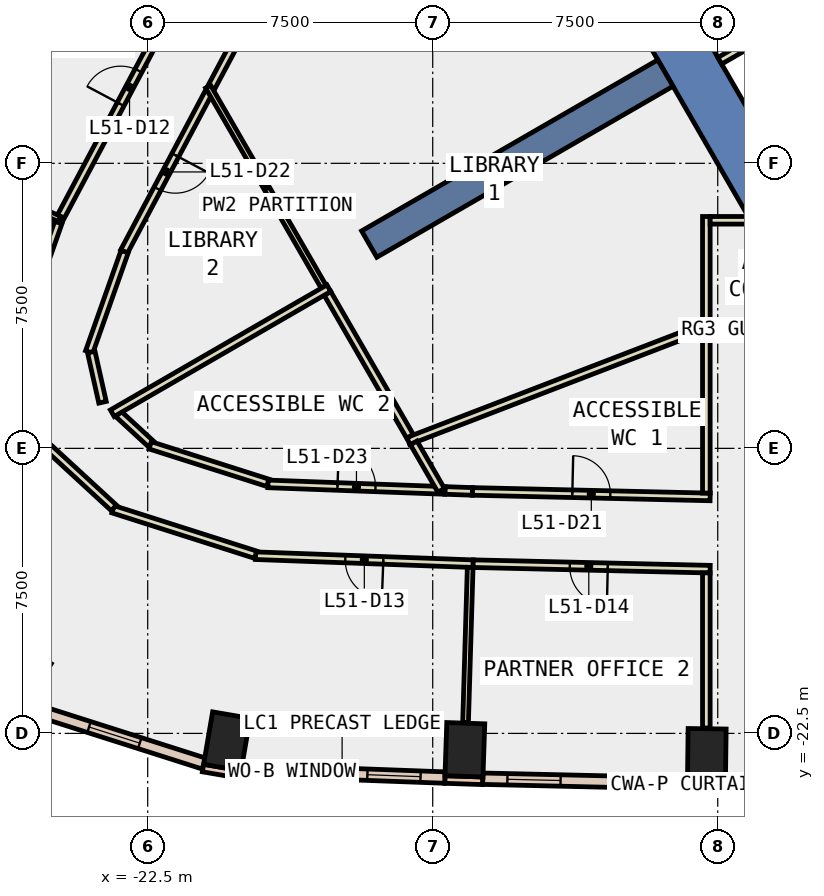
"""IFC4 building model, lengths in metres.
Left out: names, types, materials, properties, quantities, classifications, styles, units other than length and angle.
Written with IfcOpenShell. Run it as: python <this file> out.ifc"""

import sys

from ifc_helpers import new_model, si_unit, direction, frame, frame_2d, origin, origin_2d, place, context, subcontext, project, spatial, polyline, rectangle, outline, extrude, element, fill, save


model = new_model("IFC4")
c1 = context("Model", 3, precision=1e-05, world=origin(), true_north=direction((0.0, 1.0)))
c2 = subcontext(c1, "Body", "Model", "MODEL_VIEW")
j1 = project(units=[si_unit("LENGTHUNIT", "METRE"), si_unit("PLANEANGLEUNIT", "RADIAN")], contexts=[c1])
p1 = place(None, origin())
s1 = spatial("IfcSite", under=j1, at=p1, CompositionType="ELEMENT")
p2 = place(p1, origin())
s2 = spatial("IfcBuilding", under=s1, at=p2, CompositionType="ELEMENT")
p3 = place(p2, frame((0.0, 0.0, 227.6)))
s3 = spatial("IfcBuildingStorey", under=s2, at=p3, CompositionType="ELEMENT", Elevation=227.6)
for number, where, z_axis, x_axis in (
    (1, (-20.417, -22.708, -0.4), (0.0, 0.0, 1.0), (-0.986, 0.169, 0.0)),
    (2, (-14.154, -22.931, -0.4), (0.0, 0.0, 1.0), (-0.999, 0.034, 0.0)),
    (3, (-7.788, -23.078, -0.4), (0.0, 0.0, 1.0), (-1.0, 0.013, 0.0)),
):
    element("IfcColumn", number, at=place(p3, frame(where, z_axis=z_axis, x_axis=x_axis)), inside=s3, PredefinedType="COLUMN", context=c2, shape_type="SweptSolid", body=[
        extrude(rectangle(XDim=1.0, YDim=1.4, at=origin_2d()), origin(), (0.0, 0.0, 1.0), 4.2),
    ])
p4 = place(p3, frame((0.0, 0.0, -0.4)))
e4 = element("IfcWall", 4, at=p4, inside=s3, PredefinedType="SHEAR", context=c2, shape_type="SweptSolid", body=[
    extrude(outline(polyline([(-13.279, 2.5), (-6.64, -9.0), (-5.831, -7.6), (-11.662, 2.5), (-13.279, 2.5)])), origin(), (0.0, 0.0, 1.0), 4.2),
])
p5 = place(p3, frame((-8.877, -5.125, -0.4), z_axis=(0.0, 0.0, 1.0), x_axis=(-0.866017533419, -0.500013631625, 0.0)))
e5 = element("IfcWall", 5, at=p5, inside=s3, PredefinedType="SHEAR", context=c2, shape_type="SweptSolid", body=[
    extrude(rectangle(XDim=9.0, YDim=0.8, at=frame_2d((4.5, 0.0))), origin(), (0.0, 0.0, 1.0), 4.2),
])
p6 = place(p3, frame((-21.045, -23.412, 0.0), z_axis=(0.0, 0.0, 1.0), x_axis=(0.985631544579, -0.168909615862, 0.0)))
e6 = element("IfcWall", 6, at=p6, inside=s3, PredefinedType="STANDARD", context=c2, shape_type="SweptSolid", body=[
    extrude(rectangle(XDim=1.0, YDim=0.2, at=frame_2d((0.5, 0.0))), origin(), (0.0, 0.0, 1.0), 3.8),
])
p7 = place(p3, frame((-14.681, -23.713, 0.0), z_axis=(0.0, 0.0, 1.0), x_axis=(0.999415245245, -0.034193092457, 0.0)))
e7 = element("IfcWall", 7, at=p7, inside=s3, PredefinedType="STANDARD", context=c2, shape_type="SweptSolid", body=[
    extrude(rectangle(XDim=1.0, YDim=0.2, at=frame_2d((0.5, 0.0))), origin(), (0.0, 0.0, 1.0), 3.8),
])
p8 = place(p3, frame((-8.299, -23.871, 0.0), z_axis=(0.0, 0.0, 1.0), x_axis=(0.999903186316, -0.013914668364, 0.0)))
e8 = element("IfcWall", 8, at=p8, inside=s3, PredefinedType="STANDARD", context=c2, shape_type="SweptSolid", body=[
    extrude(rectangle(XDim=1.0, YDim=0.2, at=frame_2d((0.5, 0.0))), origin(), (0.0, 0.0, 1.0), 3.8),
])
p9 = place(p3, frame((-20.04, -23.464, 0.0), z_axis=(0.0, 0.0, 1.0), x_axis=(0.999318693414, -0.036907302717, 0.0)))
e9 = element("IfcWall", 9, at=p9, inside=s3, PredefinedType="STANDARD", context=c2, shape_type="SweptSolid", body=[
    extrude(rectangle(XDim=5.365, YDim=0.3, at=frame_2d((2.682, 0.0))), origin(), (0.0, 0.0, 1.0), 3.8),
])
p10 = place(p9, frame((0.641, 0.0, 0.9)))
e10 = element("IfcOpeningElement", 10, at=p10, cuts=e9, PredefinedType="OPENING", context=c2, shape_type="SweptSolid", body=[
    extrude(rectangle(XDim=1.4, YDim=2.6, at=frame_2d((0.7, 1.3))), frame((0.0, 0.16, 0.0), z_axis=(0.0, -1.0, 0.0), x_axis=(1.0, 0.0, 0.0)), (0.0, 0.0, 1.0), 0.32),
])
p11 = place(p9, frame((3.323, 0.0, 0.9)))
e11 = element("IfcOpeningElement", 11, at=p11, cuts=e9, PredefinedType="OPENING", context=c2, shape_type="SweptSolid", body=[
    extrude(rectangle(XDim=1.4, YDim=2.6, at=frame_2d((0.7, 1.3))), frame((0.0, 0.16, 0.0), z_axis=(0.0, -1.0, 0.0), x_axis=(1.0, 0.0, 0.0)), (0.0, 0.0, 1.0), 0.32),
])
p12 = place(p3, frame((-13.681, -23.692, 0.0), z_axis=(0.0, 0.0, 1.0), x_axis=(0.999734766333, -0.023030349233, 0.0)))
e12 = element("IfcWall", 12, at=p12, inside=s3, PredefinedType="STANDARD", context=c2, shape_type="SweptSolid", body=[
    extrude(rectangle(XDim=5.385, YDim=0.3, at=frame_2d((2.693, 0.0))), origin(), (0.0, 0.0, 1.0), 3.8),
])
p13 = place(p12, frame((0.646, 0.0, 0.9)))
e13 = element("IfcOpeningElement", 13, at=p13, cuts=e12, PredefinedType="OPENING", context=c2, shape_type="SweptSolid", body=[
    extrude(rectangle(XDim=1.4, YDim=2.6, at=frame_2d((0.7, 1.3))), frame((0.0, 0.16, 0.0), z_axis=(0.0, -1.0, 0.0), x_axis=(1.0, 0.0, 0.0)), (0.0, 0.0, 1.0), 0.32),
])
p14 = place(p12, frame((3.339, 0.0, 0.9)))
e14 = element("IfcOpeningElement", 14, at=p14, cuts=e12, PredefinedType="OPENING", context=c2, shape_type="SweptSolid", body=[
    extrude(rectangle(XDim=1.4, YDim=2.6, at=frame_2d((0.7, 1.3))), frame((0.0, 0.16, 0.0), z_axis=(0.0, -1.0, 0.0), x_axis=(1.0, 0.0, 0.0)), (0.0, 0.0, 1.0), 0.32),
])
p15 = place(p3, frame((-25.729, -21.795, 0.0), z_axis=(0.0, 0.0, 1.0), x_axis=(0.952886818649, -0.30332608006, 0.0)))
e15 = element("IfcWall", 15, at=p15, inside=s3, PredefinedType="STANDARD", context=c2, shape_type="SweptSolid", body=[
    extrude(rectangle(XDim=4.939, YDim=0.3, at=frame_2d((2.469, 0.0))), origin(), (0.0, 0.0, 1.0), 3.8),
])
p16 = place(p15, frame((1.769, 0.0, 0.9)))
e16 = element("IfcOpeningElement", 16, at=p16, cuts=e15, PredefinedType="OPENING", context=c2, shape_type="SweptSolid", body=[
    extrude(rectangle(XDim=1.4, YDim=2.6, at=frame_2d((0.7, 1.3))), frame((0.0, 0.16, 0.0), z_axis=(0.0, -1.0, 0.0), x_axis=(1.0, 0.0, 0.0)), (0.0, 0.0, 1.0), 0.32),
])
p17 = place(p3, frame((-19.419, -2.856, 0.0), z_axis=(0.0, 0.0, 1.0), x_axis=(-0.469627838973, -0.882864481595, 0.0)))
e17 = element("IfcWall", 17, at=p17, inside=s3, PredefinedType="PARTITIONING", context=c2, shape_type="SweptSolid", body=[
    extrude(rectangle(XDim=2.996, YDim=0.2, at=frame_2d((1.498, 0.0))), origin(), (0.0, 0.0, 1.0), 3.8),
])
p18 = place(p3, frame((-14.679, -16.107, 0.0), z_axis=(0.0, 0.0, 1.0), x_axis=(0.999351224613, -0.036015689132, 0.0)))
e18 = element("IfcWall", 18, at=p18, inside=s3, PredefinedType="PARTITIONING", context=c2, shape_type="SweptSolid", body=[
    extrude(rectangle(XDim=0.725, YDim=0.2, at=frame_2d((0.363, 0.0))), origin(), (0.0, 0.0, 1.0), 3.8),
])
p19 = place(p3, frame((-13.954, -16.133, 0.0), z_axis=(0.0, 0.0, 1.0), x_axis=(0.999731273021, -0.023181495732, 0.0)))
e19 = element("IfcWall", 19, at=p19, inside=s3, PredefinedType="PARTITIONING", context=c2, shape_type="SweptSolid", body=[
    extrude(rectangle(XDim=6.256, YDim=0.2, at=frame_2d((3.128, 0.0))), origin(), (0.0, 0.0, 1.0), 3.8),
])
p20 = place(p19, frame((2.628, 0.0, 0.0)))
e20 = element("IfcOpeningElement", 20, at=p20, cuts=e19, PredefinedType="OPENING", context=c2, shape_type="SweptSolid", body=[
    extrude(rectangle(XDim=1.0, YDim=2.1, at=frame_2d((0.5, 1.05))), frame((0.0, 0.11, 0.0), z_axis=(0.0, -1.0, 0.0), x_axis=(1.0, 0.0, 0.0)), (0.0, 0.0, 1.0), 0.22),
])
p21 = place(p3, frame((-20.896, -5.634, 0.0), z_axis=(0.0, 0.0, 1.0), x_axis=(-0.469448951755, -0.882959614986, 0.0)))
e21 = element("IfcWall", 21, at=p21, inside=s3, PredefinedType="PARTITIONING", context=c2, shape_type="SweptSolid", body=[
    extrude(rectangle(XDim=4.74, YDim=0.2, at=frame_2d((2.37, 0.0))), origin(), (0.0, 0.0, 1.0), 3.8),
])
p22 = place(p21, frame((1.87, 0.0, 0.0)))
e22 = element("IfcOpeningElement", 22, at=p22, cuts=e21, PredefinedType="OPENING", context=c2, shape_type="SweptSolid", body=[
    extrude(rectangle(XDim=1.0, YDim=2.1, at=frame_2d((0.5, 1.05))), frame((0.0, 0.11, 0.0), z_axis=(0.0, -1.0, 0.0), x_axis=(1.0, 0.0, 0.0)), (0.0, 0.0, 1.0), 0.22),
])
p23 = place(p3, frame((-23.108, -9.825, 0.0), z_axis=(0.0, 0.0, 1.0), x_axis=(-0.333166995935, -0.942867834227, 0.0)))
e23 = element("IfcWall", 23, at=p23, inside=s3, PredefinedType="PARTITIONING", context=c2, shape_type="SweptSolid", body=[
    extrude(rectangle(XDim=2.798, YDim=0.2, at=frame_2d((1.399, 0.0))), origin(), (0.0, 0.0, 1.0), 3.8),
])
p24 = place(p3, frame((-23.985, -12.467, 0.0), z_axis=(0.0, 0.0, 1.0), x_axis=(0.2188980935, -0.975747725932, 0.0)))
e24 = element("IfcWall", 24, at=p24, inside=s3, PredefinedType="PARTITIONING", context=c2, shape_type="SweptSolid", body=[
    extrude(rectangle(XDim=1.353, YDim=0.2, at=frame_2d((0.676, 0.0))), origin(), (0.0, 0.0, 1.0), 3.8),
])
p25 = place(p3, frame((-23.272, -14.093, 0.0), z_axis=(0.0, 0.0, 1.0), x_axis=(0.735605495063, -0.677410182705, 0.0)))
e25 = element("IfcWall", 25, at=p25, inside=s3, PredefinedType="PARTITIONING", context=c2, shape_type="SweptSolid", body=[
    extrude(rectangle(XDim=1.166, YDim=0.2, at=frame_2d((0.583, 0.0))), origin(), (0.0, 0.0, 1.0), 3.8),
])
p26 = place(p3, frame((-22.435, -14.92, 0.0), z_axis=(0.0, 0.0, 1.0), x_axis=(0.952831275662, -0.303500510906, 0.0)))
e26 = element("IfcWall", 26, at=p26, inside=s3, PredefinedType="PARTITIONING", context=c2, shape_type="SweptSolid", body=[
    extrude(rectangle(XDim=3.259, YDim=0.2, at=frame_2d((1.629, 0.0))), origin(), (0.0, 0.0, 1.0), 3.8),
])
p27 = place(p3, frame((-19.335, -15.935, 0.0), z_axis=(0.0, 0.0, 1.0), x_axis=(0.999319348495, -0.036889561184, 0.0)))
e27 = element("IfcWall", 27, at=p27, inside=s3, PredefinedType="PARTITIONING", context=c2, shape_type="SweptSolid", body=[
    extrude(rectangle(XDim=4.659, YDim=0.2, at=frame_2d((2.33, 0.0))), origin(), (0.0, 0.0, 1.0), 3.8),
])
p28 = place(p27, frame((1.83, 0.0, 0.0)))
e28 = element("IfcOpeningElement", 28, at=p28, cuts=e27, PredefinedType="OPENING", context=c2, shape_type="SweptSolid", body=[
    extrude(rectangle(XDim=1.0, YDim=2.1, at=frame_2d((0.5, 1.05))), frame((0.0, 0.11, 0.0), z_axis=(0.0, -1.0, 0.0), x_axis=(1.0, 0.0, 0.0)), (0.0, 0.0, 1.0), 0.22),
])
p29 = place(p3, frame((-24.866, -9.053, 0.0), z_axis=(0.0, 0.0, 1.0), x_axis=(0.469431794586, 0.882968736837, 0.0)))
e29 = element("IfcWall", 29, at=p29, inside=s3, PredefinedType="PARTITIONING", context=c2, shape_type="SweptSolid", body=[
    extrude(rectangle(XDim=8.046, YDim=0.2, at=frame_2d((4.023, 0.0))), origin(), (0.0, 0.0, 1.0), 3.8),
])
p30 = place(p29, frame((3.522, 0.0, 0.0)))
e30 = element("IfcOpeningElement", 30, at=p30, cuts=e29, PredefinedType="OPENING", context=c2, shape_type="SweptSolid", body=[
    extrude(rectangle(XDim=1.0, YDim=2.1, at=frame_2d((0.5, 1.05))), frame((0.0, 0.11, 0.0), z_axis=(0.0, -1.0, 0.0), x_axis=(1.0, 0.0, 0.0)), (0.0, 0.0, 1.0), 0.22),
])
p31 = place(p3, frame((-13.936, -18.035, 0.0), z_axis=(0.0, 0.0, 1.0), x_axis=(-0.999322629955, 0.036800560578, 0.0)))
e31 = element("IfcWall", 31, at=p31, inside=s3, PredefinedType="PARTITIONING", context=c2, shape_type="SweptSolid", body=[
    extrude(rectangle(XDim=5.732, YDim=0.2, at=frame_2d((2.866, 0.0))), origin(), (0.0, 0.0, 1.0), 3.8),
])
p32 = place(p31, frame((2.366, 0.0, 0.0)))
e32 = element("IfcOpeningElement", 32, at=p32, cuts=e31, PredefinedType="OPENING", context=c2, shape_type="SweptSolid", body=[
    extrude(rectangle(XDim=1.0, YDim=2.1, at=frame_2d((0.5, 1.05))), frame((0.0, 0.11, 0.0), z_axis=(0.0, -1.0, 0.0), x_axis=(1.0, 0.0, 0.0)), (0.0, 0.0, 1.0), 0.22),
])
p33 = place(p3, frame((-19.66, -17.798, 0.0), z_axis=(0.0, 0.0, 1.0), x_axis=(-0.952838618572, 0.303477457083, 0.0)))
e33 = element("IfcWall", 33, at=p33, inside=s3, PredefinedType="PARTITIONING", context=c2, shape_type="SweptSolid", body=[
    extrude(rectangle(XDim=3.938, YDim=0.2, at=frame_2d((1.969, 0.0))), origin(), (0.0, 0.0, 1.0), 3.8),
])
p34 = place(p3, frame((-23.391, -16.566, 0.0), z_axis=(0.0, 0.0, 1.0), x_axis=(-0.735846476242, 0.677148405745, 0.0)))
e34 = element("IfcWall", 34, at=p34, inside=s3, PredefinedType="PARTITIONING", context=c2, shape_type="SweptSolid", body=[
    extrude(rectangle(XDim=2.878, YDim=0.2, at=frame_2d((1.439, 0.0))), origin(), (0.0, 0.0, 1.0), 3.8),
])
p35 = place(p3, frame((-26.013, -12.345, 0.0), z_axis=(0.0, 0.0, 1.0), x_axis=(0.333116923704, 0.942885526001, 0.0)))
e35 = element("IfcWall", 35, at=p35, inside=s3, PredefinedType="PARTITIONING", context=c2, shape_type="SweptSolid", body=[
    extrude(rectangle(XDim=3.485, YDim=0.2, at=frame_2d((1.742, 0.0))), origin(), (0.0, 0.0, 1.0), 3.8),
])
p36 = place(p3, frame((-7.7, -18.179, 0.0), z_axis=(0.0, 0.0, 1.0), x_axis=(-0.999729714353, 0.023248618029, 0.0)))
e36 = element("IfcWall", 36, at=p36, inside=s3, PredefinedType="PARTITIONING", context=c2, shape_type="SweptSolid", body=[
    extrude(rectangle(XDim=6.238, YDim=0.2, at=frame_2d((3.119, 0.0))), origin(), (0.0, 0.0, 1.0), 3.8),
])
p37 = place(p36, frame((2.694, 0.0, 0.0)))
e37 = element("IfcOpeningElement", 37, at=p37, cuts=e36, PredefinedType="OPENING", context=c2, shape_type="SweptSolid", body=[
    extrude(rectangle(XDim=1.0, YDim=2.1, at=frame_2d((0.5, 1.05))), frame((0.0, 0.11, 0.0), z_axis=(0.0, -1.0, 0.0), x_axis=(1.0, 0.0, 0.0)), (0.0, 0.0, 1.0), 0.22),
])
p38 = place(p3, frame((-5.888, -3.902, 0.0), z_axis=(0.0, 0.0, 1.0), x_axis=(-0.866316547501, -0.499495384889, 0.0)))
e38 = element("IfcWall", 38, at=p38, inside=s3, PredefinedType="PARTITIONING", context=c2, shape_type="SweptSolid", body=[
    extrude(rectangle(XDim=1.8, YDim=0.2, at=frame_2d((0.9, 0.0))), origin(), (0.0, 0.0, 1.0), 3.8),
])
p39 = place(p3, frame((-7.8, -11.69, 0.0), z_axis=(0.0, 0.0, 1.0), x_axis=(0.0, 1.0, 0.0)))
e39 = element("IfcWall", 39, at=p39, inside=s3, PredefinedType="PARTITIONING", context=c2, shape_type="SweptSolid", body=[
    extrude(rectangle(XDim=2.791, YDim=0.2, at=frame_2d((1.396, 0.0))), origin(), (0.0, 0.0, 1.0), 3.8),
])
p40 = place(p3, frame((-7.7, -8.999, 0.0), z_axis=(0.0, 0.0, 1.0), x_axis=(1.0, 0.0, 0.0)))
e40 = element("IfcWall", 40, at=p40, inside=s3, PredefinedType="PARTITIONING", context=c2, shape_type="SweptSolid", body=[
    extrude(rectangle(XDim=1.059, YDim=0.2, at=frame_2d((0.529, 0.0))), origin(), (0.0, 0.0, 1.0), 3.8),
])
p41 = place(p3, frame((-7.8, -16.176, 0.0), z_axis=(0.0, 0.0, 1.0), x_axis=(0.0, 1.0, 0.0)))
e41 = element("IfcWall", 41, at=p41, inside=s3, PredefinedType="PARTITIONING", context=c2, shape_type="SweptSolid", body=[
    extrude(rectangle(XDim=4.286, YDim=0.2, at=frame_2d((2.143, 0.0))), origin(), (0.0, 0.0, 1.0), 3.8),
])
p42 = place(p3, frame((-7.8, -22.358, 0.0), z_axis=(0.0, 0.0, 1.0), x_axis=(0.0, 1.0, 0.0)))
e42 = element("IfcWall", 42, at=p42, inside=s3, PredefinedType="PARTITIONING", context=c2, shape_type="SweptSolid", body=[
    extrude(rectangle(XDim=4.082, YDim=0.2, at=frame_2d((2.041, 0.0))), origin(), (0.0, 0.0, 1.0), 3.8),
])
p43 = place(p3, frame((-7.707, -11.755, 0.0), z_axis=(0.0, 0.0, 1.0), x_axis=(-0.933420343818, -0.358784701105, 0.0)))
e43 = element("IfcWall", 43, at=p43, inside=s3, PredefinedType="PARTITIONING", context=c2, shape_type="SweptSolid", body=[
    extrude(rectangle(XDim=8.501, YDim=0.2, at=frame_2d((4.25, 0.0))), origin(), (0.0, 0.0, 1.0), 3.8),
])
p44 = place(p3, frame((-17.87, -10.749, 0.0), z_axis=(0.0, 0.0, 1.0), x_axis=(-0.499907758807, 0.866078652713, 0.0)))
e44 = element("IfcWall", 44, at=p44, inside=s3, PredefinedType="PARTITIONING", context=c2, shape_type="SweptSolid", body=[
    extrude(rectangle(XDim=6.083, YDim=0.15, at=frame_2d((3.042, 0.0))), origin(), (0.0, 0.0, 1.0), 3.8),
])
p45 = place(p3, frame((-15.599, -14.682, 0.0), z_axis=(0.0, 0.0, 1.0), x_axis=(-0.500033987016, 0.866005780482, 0.0)))
e45 = element("IfcWall", 45, at=p45, inside=s3, PredefinedType="PARTITIONING", context=c2, shape_type="SweptSolid", body=[
    extrude(rectangle(XDim=4.342, YDim=0.2, at=frame_2d((2.171, 0.0))), origin(), (0.0, 0.0, 1.0), 3.8),
])
p46 = place(p3, frame((-14.778, -16.103, 0.0), z_axis=(0.0, 0.0, 1.0), x_axis=(-0.500495009846, 0.865739421027, 0.0)))
e46 = element("IfcWall", 46, at=p46, inside=s3, PredefinedType="PARTITIONING", context=c2, shape_type="SweptSolid", body=[
    extrude(rectangle(XDim=1.44, YDim=0.2, at=frame_2d((0.72, 0.0))), origin(), (0.0, 0.0, 1.0), 3.8),
])
p47 = place(p3, frame((-17.733, -10.785, 0.0), z_axis=(0.0, 0.0, 1.0), x_axis=(-0.865978611197, -0.500081038382, 0.0)))
e47 = element("IfcWall", 47, at=p47, inside=s3, PredefinedType="PARTITIONING", context=c2, shape_type="SweptSolid", body=[
    extrude(rectangle(XDim=6.581, YDim=0.2, at=frame_2d((3.291, 0.0))), origin(), (0.0, 0.0, 1.0), 3.8),
])
p48 = place(p3, frame((-24.819, -8.964, 0.0), z_axis=(0.0, 0.0, 1.0), x_axis=(-0.915460951187, 0.402406817602, 0.0)))
e48 = element("IfcWall", 48, at=p48, inside=s3, PredefinedType="PARTITIONING", context=c2, shape_type="SweptSolid", body=[
    extrude(rectangle(XDim=4.192, YDim=0.15, at=frame_2d((2.096, 0.0))), origin(), (0.0, 0.0, 1.0), 3.8),
])
p49 = place(p3, frame((-14.014, -18.132, 0.0), z_axis=(0.0, 0.0, 1.0), x_axis=(-0.029914181802, -0.999552470722, 0.0)))
e49 = element("IfcWall", 49, at=p49, inside=s3, PredefinedType="PARTITIONING", context=c2, shape_type="SweptSolid", body=[
    extrude(rectangle(XDim=4.081, YDim=0.15, at=frame_2d((2.04, 0.0))), origin(), (0.0, 0.0, 1.0), 3.8),
])
p50 = place(p10, origin())
e50 = element("IfcWindow", 50, at=p50, inside=s3, PartitioningType="SINGLE_PANEL", PredefinedType="WINDOW", context=c2, shape_type="SweptSolid", body=[
    extrude(rectangle(XDim=1.4, YDim=2.6, at=frame_2d((0.7, 1.3))), frame((0.0, 0.03, 0.0), z_axis=(0.0, -1.0, 0.0), x_axis=(1.0, 0.0, 0.0)), (0.0, 0.0, 1.0), 0.06),
])
fill(e10, e50)
p51 = place(p11, origin())
e51 = element("IfcWindow", 51, at=p51, inside=s3, PartitioningType="SINGLE_PANEL", PredefinedType="WINDOW", context=c2, shape_type="SweptSolid", body=[
    extrude(rectangle(XDim=1.4, YDim=2.6, at=frame_2d((0.7, 1.3))), frame((0.0, 0.03, 0.0), z_axis=(0.0, -1.0, 0.0), x_axis=(1.0, 0.0, 0.0)), (0.0, 0.0, 1.0), 0.06),
])
fill(e11, e51)
p52 = place(p13, origin())
e52 = element("IfcWindow", 52, at=p52, inside=s3, PartitioningType="SINGLE_PANEL", PredefinedType="WINDOW", context=c2, shape_type="SweptSolid", body=[
    extrude(rectangle(XDim=1.4, YDim=2.6, at=frame_2d((0.7, 1.3))), frame((0.0, 0.03, 0.0), z_axis=(0.0, -1.0, 0.0), x_axis=(1.0, 0.0, 0.0)), (0.0, 0.0, 1.0), 0.06),
])
fill(e13, e52)
p53 = place(p14, origin())
e53 = element("IfcWindow", 53, at=p53, inside=s3, PartitioningType="SINGLE_PANEL", PredefinedType="WINDOW", context=c2, shape_type="SweptSolid", body=[
    extrude(rectangle(XDim=1.4, YDim=2.6, at=frame_2d((0.7, 1.3))), frame((0.0, 0.03, 0.0), z_axis=(0.0, -1.0, 0.0), x_axis=(1.0, 0.0, 0.0)), (0.0, 0.0, 1.0), 0.06),
])
fill(e14, e53)
p54 = place(p16, origin())
e54 = element("IfcWindow", 54, at=p54, inside=s3, PartitioningType="SINGLE_PANEL", PredefinedType="WINDOW", context=c2, shape_type="SweptSolid", body=[
    extrude(rectangle(XDim=1.4, YDim=2.6, at=frame_2d((0.7, 1.3))), frame((0.0, 0.03, 0.0), z_axis=(0.0, -1.0, 0.0), x_axis=(1.0, 0.0, 0.0)), (0.0, 0.0, 1.0), 0.06),
])
fill(e16, e54)
p55 = place(p30, origin())
e55 = element("IfcDoor", 55, at=p55, inside=s3, OperationType="SINGLE_SWING_LEFT", PredefinedType="DOOR", context=c2, shape_type="SweptSolid", body=[
    extrude(rectangle(XDim=1.0, YDim=2.1, at=frame_2d((0.5, 1.05))), frame((0.0, 0.025, 0.0), z_axis=(0.0, -1.0, 0.0), x_axis=(1.0, 0.0, 0.0)), (0.0, 0.0, 1.0), 0.05),
])
fill(e30, e55)
p56 = place(p32, origin())
e56 = element("IfcDoor", 56, at=p56, inside=s3, OperationType="SINGLE_SWING_LEFT", PredefinedType="DOOR", context=c2, shape_type="SweptSolid", body=[
    extrude(rectangle(XDim=1.0, YDim=2.1, at=frame_2d((0.5, 1.05))), frame((0.0, 0.025, 0.0), z_axis=(0.0, -1.0, 0.0), x_axis=(1.0, 0.0, 0.0)), (0.0, 0.0, 1.0), 0.05),
])
fill(e32, e56)
p57 = place(p37, origin())
e57 = element("IfcDoor", 57, at=p57, inside=s3, OperationType="SINGLE_SWING_LEFT", PredefinedType="DOOR", context=c2, shape_type="SweptSolid", body=[
    extrude(rectangle(XDim=1.0, YDim=2.1, at=frame_2d((0.5, 1.05))), frame((0.0, 0.025, 0.0), z_axis=(0.0, -1.0, 0.0), x_axis=(1.0, 0.0, 0.0)), (0.0, 0.0, 1.0), 0.05),
])
fill(e37, e57)
p58 = place(p20, origin())
e58 = element("IfcDoor", 58, at=p58, inside=s3, OperationType="SINGLE_SWING_LEFT", PredefinedType="DOOR", context=c2, shape_type="SweptSolid", body=[
    extrude(rectangle(XDim=1.0, YDim=2.1, at=frame_2d((0.5, 1.05))), frame((0.0, 0.025, 0.0), z_axis=(0.0, -1.0, 0.0), x_axis=(1.0, 0.0, 0.0)), (0.0, 0.0, 1.0), 0.05),
])
fill(e20, e58)
p59 = place(p22, origin())
e59 = element("IfcDoor", 59, at=p59, inside=s3, OperationType="SINGLE_SWING_LEFT", PredefinedType="DOOR", context=c2, shape_type="SweptSolid", body=[
    extrude(rectangle(XDim=1.0, YDim=2.1, at=frame_2d((0.5, 1.05))), frame((0.0, 0.025, 0.0), z_axis=(0.0, -1.0, 0.0), x_axis=(1.0, 0.0, 0.0)), (0.0, 0.0, 1.0), 0.05),
])
fill(e22, e59)
p60 = place(p28, origin())
e60 = element("IfcDoor", 60, at=p60, inside=s3, OperationType="SINGLE_SWING_LEFT", PredefinedType="DOOR", context=c2, shape_type="SweptSolid", body=[
    extrude(rectangle(XDim=1.0, YDim=2.1, at=frame_2d((0.5, 1.05))), frame((0.0, 0.025, 0.0), z_axis=(0.0, -1.0, 0.0), x_axis=(1.0, 0.0, 0.0)), (0.0, 0.0, 1.0), 0.05),
])
fill(e28, e60)
save(model, sys.argv[1])
